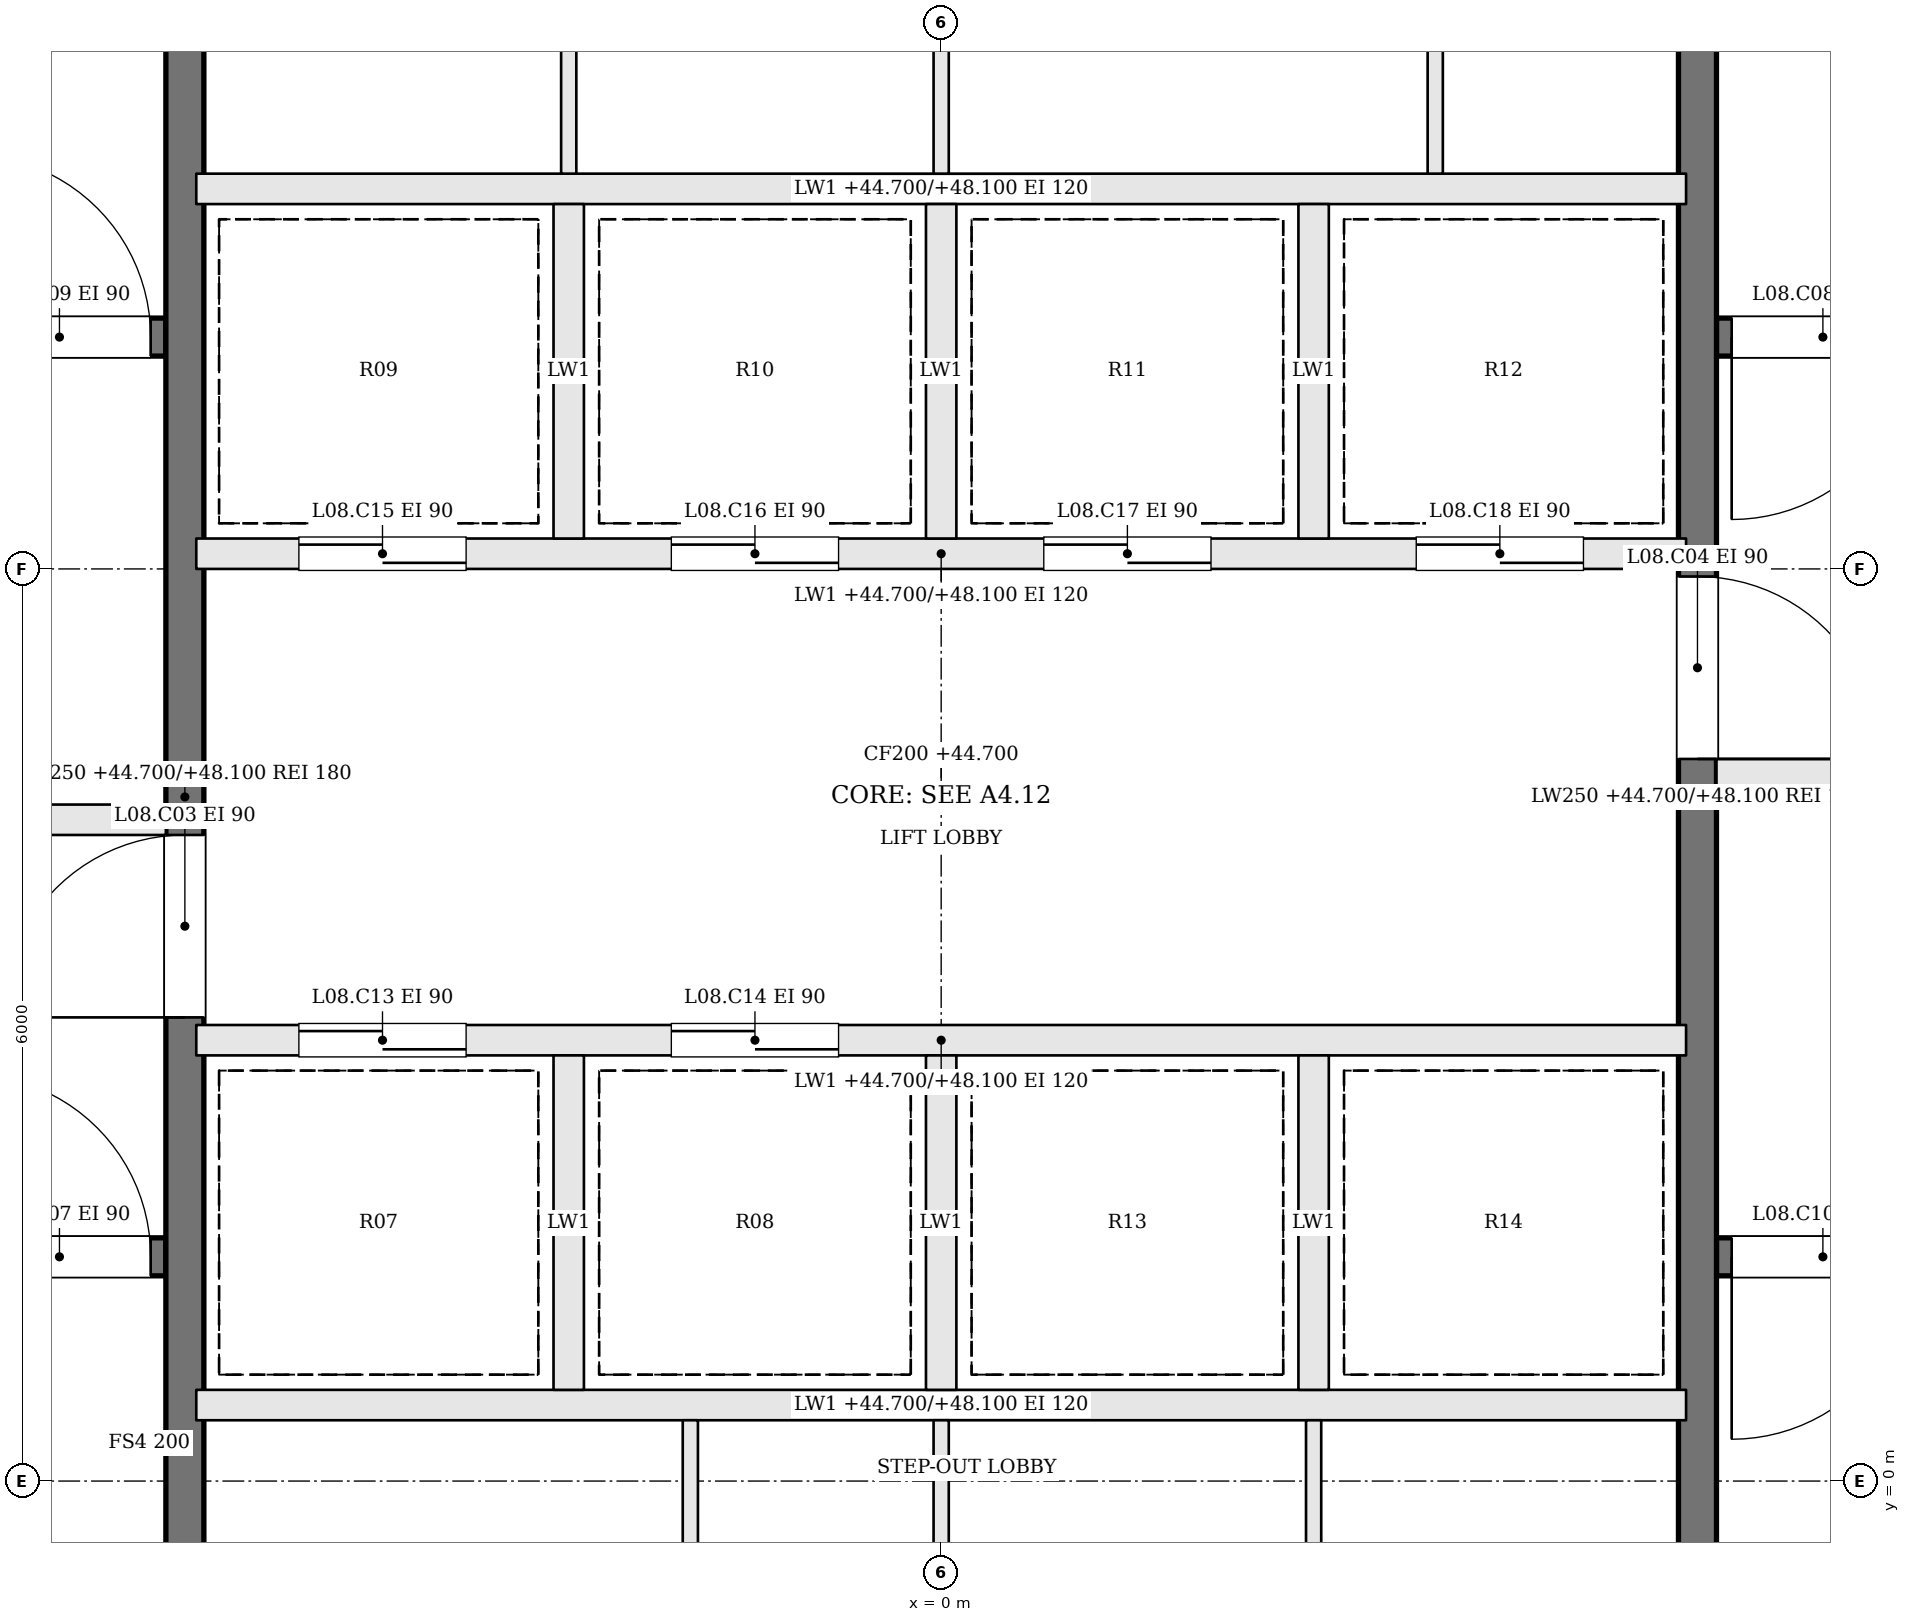
"""IFC4 building model, lengths in metres.
Left out: names, types, materials, properties, quantities, classifications, styles, units other than length and angle.
Written with IfcOpenShell. Run it as: python <this file> out.ifc"""

import sys

from ifc_helpers import new_model, si_unit, direction, frame, frame_2d, origin, place, context, subcontext, project, spatial, rectangle, extrude, element, fill, save


model = new_model("IFC4")
c1 = context("Model", 3, precision=1e-05, world=origin(), true_north=direction((0.0, 1.0)))
c2 = subcontext(c1, "Body", "Model", "MODEL_VIEW")
j1 = project(units=[si_unit("LENGTHUNIT", "METRE"), si_unit("PLANEANGLEUNIT", "RADIAN")], contexts=[c1])
p1 = place(None, origin())
s1 = spatial("IfcSite", under=j1, at=p1, CompositionType="ELEMENT")
p2 = place(p1, origin())
s2 = spatial("IfcBuilding", under=s1, at=p2, CompositionType="ELEMENT")
p3 = place(p2, frame((0.0, 0.0, 44.7)))
s3 = spatial("IfcBuildingStorey", under=s2, at=p3, CompositionType="ELEMENT", Elevation=44.7)
p4 = place(p3, frame((-11.6, 1.475, 0.0), z_axis=(0.0, 0.0, 1.0), x_axis=(1.0, 0.0, 0.0)))
e1 = element("IfcWall", 1, at=p4, inside=s3, PredefinedType="SOLIDWALL", context=c2, shape_type="SweptSolid", body=[
    extrude(rectangle(XDim=6.5, YDim=0.25, at=frame_2d((3.25, 0.0))), origin(), (0.0, 0.0, 1.0), 3.4),
])
p5 = place(p4, frame((5.2, 0.0, 0.0)))
e2 = element("IfcOpeningElement", 2, at=p5, cuts=e1, PredefinedType="OPENING", context=c2, shape_type="SweptSolid", body=[
    extrude(rectangle(XDim=1.2, YDim=2.1, at=frame_2d((0.6, 1.05))), frame((0.0, 0.135, 0.0), z_axis=(0.0, -1.0, 0.0), x_axis=(1.0, 0.0, 0.0)), (0.0, 0.0, 1.0), 0.27),
])
p6 = place(p3, frame((11.6, 7.525, 0.0), z_axis=(0.0, 0.0, 1.0), x_axis=(-1.0, 0.0, 0.0)))
e3 = element("IfcWall", 3, at=p6, inside=s3, PredefinedType="SOLIDWALL", context=c2, shape_type="SweptSolid", body=[
    extrude(rectangle(XDim=6.5, YDim=0.25, at=frame_2d((3.25, 0.0))), origin(), (0.0, 0.0, 1.0), 3.4),
])
p7 = place(p6, frame((5.2, 0.0, 0.0)))
e4 = element("IfcOpeningElement", 4, at=p7, cuts=e3, PredefinedType="OPENING", context=c2, shape_type="SweptSolid", body=[
    extrude(rectangle(XDim=1.2, YDim=2.1, at=frame_2d((0.6, 1.05))), frame((0.0, 0.135, 0.0), z_axis=(0.0, -1.0, 0.0), x_axis=(1.0, 0.0, 0.0)), (0.0, 0.0, 1.0), 0.27),
])
p8 = place(p3, frame((-11.6, 4.35, 0.0), z_axis=(0.0, 0.0, 1.0), x_axis=(1.0, 0.0, 0.0)))
e5 = element("IfcWall", 5, at=p8, inside=s3, PredefinedType="SOLIDWALL", context=c2, shape_type="SweptSolid", body=[
    extrude(rectangle(XDim=6.5, YDim=0.2, at=frame_2d((3.25, 0.0))), origin(), (0.0, 0.0, 1.0), 3.4),
])
p9 = place(p8, frame((3.8, 0.0, 0.0)))
e6 = element("IfcOpeningElement", 6, at=p9, cuts=e5, PredefinedType="OPENING", context=c2, shape_type="SweptSolid", body=[
    extrude(rectangle(XDim=1.2, YDim=2.1, at=frame_2d((0.6, 1.05))), frame((0.0, 0.11, 0.0), z_axis=(0.0, -1.0, 0.0), x_axis=(1.0, 0.0, 0.0)), (0.0, 0.0, 1.0), 0.22),
])
p10 = place(p8, frame((0.5, 0.0, 0.0)))
e7 = element("IfcOpeningElement", 7, at=p10, cuts=e5, PredefinedType="OPENING", context=c2, shape_type="SweptSolid", body=[
    extrude(rectangle(XDim=1.2, YDim=2.1, at=frame_2d((0.6, 1.05))), frame((0.0, 0.11, 0.0), z_axis=(0.0, -1.0, 0.0), x_axis=(1.0, 0.0, 0.0)), (0.0, 0.0, 1.0), 0.22),
])
p11 = place(p3, frame((11.6, 4.65, 0.0), z_axis=(0.0, 0.0, 1.0), x_axis=(-1.0, 0.0, 0.0)))
e8 = element("IfcWall", 8, at=p11, inside=s3, PredefinedType="SOLIDWALL", context=c2, shape_type="SweptSolid", body=[
    extrude(rectangle(XDim=6.5, YDim=0.2, at=frame_2d((3.25, 0.0))), origin(), (0.0, 0.0, 1.0), 3.4),
])
p12 = place(p11, frame((3.8, 0.0, 0.0)))
e9 = element("IfcOpeningElement", 9, at=p12, cuts=e8, PredefinedType="OPENING", context=c2, shape_type="SweptSolid", body=[
    extrude(rectangle(XDim=1.2, YDim=2.1, at=frame_2d((0.6, 1.05))), frame((0.0, 0.11, 0.0), z_axis=(0.0, -1.0, 0.0), x_axis=(1.0, 0.0, 0.0)), (0.0, 0.0, 1.0), 0.22),
])
p13 = place(p11, frame((0.5, 0.0, 0.0)))
e10 = element("IfcOpeningElement", 10, at=p13, cuts=e8, PredefinedType="OPENING", context=c2, shape_type="SweptSolid", body=[
    extrude(rectangle(XDim=1.2, YDim=2.1, at=frame_2d((0.6, 1.05))), frame((0.0, 0.11, 0.0), z_axis=(0.0, -1.0, 0.0), x_axis=(1.0, 0.0, 0.0)), (0.0, 0.0, 1.0), 0.22),
])
p14 = place(p3, frame((-11.6, 7.525, 0.0), z_axis=(0.0, 0.0, 1.0), x_axis=(1.0, 0.0, 0.0)))
e11 = element("IfcWall", 11, at=p14, inside=s3, PredefinedType="SOLIDWALL", context=c2, shape_type="SweptSolid", body=[
    extrude(rectangle(XDim=6.5, YDim=0.25, at=frame_2d((3.25, 0.0))), origin(), (0.0, 0.0, 1.0), 3.4),
])
p15 = place(p14, frame((5.2, 0.0, 0.0)))
e12 = element("IfcOpeningElement", 12, at=p15, cuts=e11, PredefinedType="OPENING", context=c2, shape_type="SweptSolid", body=[
    extrude(rectangle(XDim=1.2, YDim=2.1, at=frame_2d((0.6, 1.05))), frame((0.0, 0.135, 0.0), z_axis=(0.0, -1.0, 0.0), x_axis=(1.0, 0.0, 0.0)), (0.0, 0.0, 1.0), 0.27),
])
p16 = place(p3, frame((11.6, 1.475, 0.0), z_axis=(0.0, 0.0, 1.0), x_axis=(-1.0, 0.0, 0.0)))
e13 = element("IfcWall", 13, at=p16, inside=s3, PredefinedType="SOLIDWALL", context=c2, shape_type="SweptSolid", body=[
    extrude(rectangle(XDim=6.5, YDim=0.25, at=frame_2d((3.25, 0.0))), origin(), (0.0, 0.0, 1.0), 3.4),
])
p17 = place(p16, frame((5.2, 0.0, 0.0)))
e14 = element("IfcOpeningElement", 14, at=p17, cuts=e13, PredefinedType="OPENING", context=c2, shape_type="SweptSolid", body=[
    extrude(rectangle(XDim=1.2, YDim=2.1, at=frame_2d((0.6, 1.05))), frame((0.0, 0.135, 0.0), z_axis=(0.0, -1.0, 0.0), x_axis=(1.0, 0.0, 0.0)), (0.0, 0.0, 1.0), 0.27),
])
p18 = place(p3, frame((-4.975, -1.6, 0.0), z_axis=(0.0, 0.0, 1.0), x_axis=(0.0, 1.0, 0.0)))
e15 = element("IfcWall", 15, at=p18, inside=s3, PredefinedType="SOLIDWALL", context=c2, shape_type="SweptSolid", body=[
    extrude(rectangle(XDim=12.2, YDim=0.25, at=frame_2d((6.1, 0.0))), origin(), (0.0, 0.0, 1.0), 3.4),
])
p19 = place(p18, frame((4.65, 0.0, 0.0)))
e16 = element("IfcOpeningElement", 16, at=p19, cuts=e15, PredefinedType="OPENING", context=c2, shape_type="SweptSolid", body=[
    extrude(rectangle(XDim=1.2, YDim=2.1, at=frame_2d((0.6, 1.05))), frame((0.0, 0.135, 0.0), z_axis=(0.0, -1.0, 0.0), x_axis=(1.0, 0.0, 0.0)), (0.0, 0.0, 1.0), 0.27),
])
p20 = place(p3, frame((4.975, 10.6, 0.0), z_axis=(0.0, 0.0, 1.0), x_axis=(0.0, -1.0, 0.0)))
e17 = element("IfcWall", 17, at=p20, inside=s3, PredefinedType="SOLIDWALL", context=c2, shape_type="SweptSolid", body=[
    extrude(rectangle(XDim=12.2, YDim=0.25, at=frame_2d((6.1, 0.0))), origin(), (0.0, 0.0, 1.0), 3.4),
])
p21 = place(p20, frame((4.65, 0.0, 0.0)))
e18 = element("IfcOpeningElement", 18, at=p21, cuts=e17, PredefinedType="OPENING", context=c2, shape_type="SweptSolid", body=[
    extrude(rectangle(XDim=1.2, YDim=2.1, at=frame_2d((0.6, 1.05))), frame((0.0, 0.135, 0.0), z_axis=(0.0, -1.0, 0.0), x_axis=(1.0, 0.0, 0.0)), (0.0, 0.0, 1.0), 0.27),
])
p22 = place(p3, frame((-4.9, 0.5, 0.0), z_axis=(0.0, 0.0, 1.0), x_axis=(1.0, 0.0, 0.0)))
e19 = element("IfcWall", 19, at=p22, inside=s3, PredefinedType="SOLIDWALL", context=c2, shape_type="SweptSolid", body=[
    extrude(rectangle(XDim=9.8, YDim=0.2, at=frame_2d((4.9, 0.0))), origin(), (0.0, 0.0, 1.0), 3.4),
])
p23 = place(p3, frame((-4.9, 2.9, 0.0), z_axis=(0.0, 0.0, 1.0), x_axis=(1.0, 0.0, 0.0)))
e20 = element("IfcWall", 20, at=p23, inside=s3, PredefinedType="SOLIDWALL", context=c2, shape_type="SweptSolid", body=[
    extrude(rectangle(XDim=9.8, YDim=0.2, at=frame_2d((4.9, 0.0))), origin(), (0.0, 0.0, 1.0), 3.4),
])
p24 = place(p23, frame((0.675, 0.0, 0.0)))
e21 = element("IfcOpeningElement", 21, at=p24, cuts=e20, PredefinedType="OPENING", context=c2, shape_type="SweptSolid", body=[
    extrude(rectangle(XDim=1.1, YDim=2.1, at=frame_2d((0.55, 1.05))), frame((0.0, 0.11, 0.0), z_axis=(0.0, -1.0, 0.0), x_axis=(1.0, 0.0, 0.0)), (0.0, 0.0, 1.0), 0.22),
])
p25 = place(p23, frame((3.125, 0.0, 0.0)))
e22 = element("IfcOpeningElement", 22, at=p25, cuts=e20, PredefinedType="OPENING", context=c2, shape_type="SweptSolid", body=[
    extrude(rectangle(XDim=1.1, YDim=2.1, at=frame_2d((0.55, 1.05))), frame((0.0, 0.11, 0.0), z_axis=(0.0, -1.0, 0.0), x_axis=(1.0, 0.0, 0.0)), (0.0, 0.0, 1.0), 0.22),
])
p26 = place(p3, frame((-4.9, 6.1, 0.0), z_axis=(0.0, 0.0, 1.0), x_axis=(1.0, 0.0, 0.0)))
e23 = element("IfcWall", 23, at=p26, inside=s3, PredefinedType="SOLIDWALL", context=c2, shape_type="SweptSolid", body=[
    extrude(rectangle(XDim=9.8, YDim=0.2, at=frame_2d((4.9, 0.0))), origin(), (0.0, 0.0, 1.0), 3.4),
])
p27 = place(p26, frame((0.675, 0.0, 0.0)))
e24 = element("IfcOpeningElement", 24, at=p27, cuts=e23, PredefinedType="OPENING", context=c2, shape_type="SweptSolid", body=[
    extrude(rectangle(XDim=1.1, YDim=2.1, at=frame_2d((0.55, 1.05))), frame((0.0, 0.11, 0.0), z_axis=(0.0, -1.0, 0.0), x_axis=(1.0, 0.0, 0.0)), (0.0, 0.0, 1.0), 0.22),
])
p28 = place(p26, frame((3.125, 0.0, 0.0)))
e25 = element("IfcOpeningElement", 25, at=p28, cuts=e23, PredefinedType="OPENING", context=c2, shape_type="SweptSolid", body=[
    extrude(rectangle(XDim=1.1, YDim=2.1, at=frame_2d((0.55, 1.05))), frame((0.0, 0.11, 0.0), z_axis=(0.0, -1.0, 0.0), x_axis=(1.0, 0.0, 0.0)), (0.0, 0.0, 1.0), 0.22),
])
p29 = place(p26, frame((5.575, 0.0, 0.0)))
e26 = element("IfcOpeningElement", 26, at=p29, cuts=e23, PredefinedType="OPENING", context=c2, shape_type="SweptSolid", body=[
    extrude(rectangle(XDim=1.1, YDim=2.1, at=frame_2d((0.55, 1.05))), frame((0.0, 0.11, 0.0), z_axis=(0.0, -1.0, 0.0), x_axis=(1.0, 0.0, 0.0)), (0.0, 0.0, 1.0), 0.22),
])
p30 = place(p26, frame((8.025, 0.0, 0.0)))
e27 = element("IfcOpeningElement", 27, at=p30, cuts=e23, PredefinedType="OPENING", context=c2, shape_type="SweptSolid", body=[
    extrude(rectangle(XDim=1.1, YDim=2.1, at=frame_2d((0.55, 1.05))), frame((0.0, 0.11, 0.0), z_axis=(0.0, -1.0, 0.0), x_axis=(1.0, 0.0, 0.0)), (0.0, 0.0, 1.0), 0.22),
])
p31 = place(p3, frame((-4.9, 8.5, 0.0), z_axis=(0.0, 0.0, 1.0), x_axis=(1.0, 0.0, 0.0)))
e28 = element("IfcWall", 28, at=p31, inside=s3, PredefinedType="SOLIDWALL", context=c2, shape_type="SweptSolid", body=[
    extrude(rectangle(XDim=9.8, YDim=0.2, at=frame_2d((4.9, 0.0))), origin(), (0.0, 0.0, 1.0), 3.4),
])
for number, where, z_axis, x_axis in (
    (29, (-2.45, 0.6, 0.0), (0.0, 0.0, 1.0), (0.0, 1.0, 0.0)),
    (30, (0.0, 0.6, 0.0), (0.0, 0.0, 1.0), (0.0, 1.0, 0.0)),
    (31, (2.45, 0.6, 0.0), (0.0, 0.0, 1.0), (0.0, 1.0, 0.0)),
    (32, (-2.45, 6.2, 0.0), (0.0, 0.0, 1.0), (0.0, 1.0, 0.0)),
    (33, (0.0, 6.2, 0.0), (0.0, 0.0, 1.0), (0.0, 1.0, 0.0)),
    (34, (2.45, 6.2, 0.0), (0.0, 0.0, 1.0), (0.0, 1.0, 0.0)),
):
    element("IfcWall", number, at=place(p3, frame(where, z_axis=z_axis, x_axis=x_axis)), inside=s3, PredefinedType="SOLIDWALL", context=c2, shape_type="SweptSolid", body=[
        extrude(rectangle(XDim=2.2, YDim=0.2, at=frame_2d((1.1, 0.0))), origin(), (0.0, 0.0, 1.0), 3.4),
    ])
for number, where, z_axis, x_axis in (
    (35, (-1.65, -1.6, 0.0), (0.0, 0.0, 1.0), (0.0, 1.0, 0.0)),
    (36, (0.0, -1.6, 0.0), (0.0, 0.0, 1.0), (0.0, 1.0, 0.0)),
    (37, (2.45, -1.6, 0.0), (0.0, 0.0, 1.0), (0.0, 1.0, 0.0)),
    (38, (-2.45, 8.6, 0.0), (0.0, 0.0, 1.0), (0.0, 1.0, 0.0)),
    (39, (0.0, 8.6, 0.0), (0.0, 0.0, 1.0), (0.0, 1.0, 0.0)),
    (40, (3.25, 8.6, 0.0), (0.0, 0.0, 1.0), (0.0, 1.0, 0.0)),
):
    element("IfcWall", number, at=place(p3, frame(where, z_axis=z_axis, x_axis=x_axis)), inside=s3, PredefinedType="PARTITIONING", context=c2, shape_type="SweptSolid", body=[
        extrude(rectangle(XDim=2.0, YDim=0.1, at=frame_2d((1.0, 0.0))), origin(), (0.0, 0.0, 1.0), 3.4),
    ])
p32 = place(p19, origin())
e41 = element("IfcDoor", 41, at=p32, inside=s3, OperationType="SINGLE_SWING_LEFT", PredefinedType="DOOR", context=c2, shape_type="SweptSolid", body=[
    extrude(rectangle(XDim=1.2, YDim=2.1, at=frame_2d((0.6, 1.05))), frame((0.0, 0.025, 0.0), z_axis=(0.0, -1.0, 0.0), x_axis=(1.0, 0.0, 0.0)), (0.0, 0.0, 1.0), 0.05),
])
fill(e16, e41)
p33 = place(p21, origin())
e42 = element("IfcDoor", 42, at=p33, inside=s3, OperationType="SINGLE_SWING_RIGHT", PredefinedType="DOOR", context=c2, shape_type="SweptSolid", body=[
    extrude(rectangle(XDim=1.2, YDim=2.1, at=frame_2d((0.6, 1.05))), frame((0.0, 0.025, 0.0), z_axis=(0.0, -1.0, 0.0), x_axis=(1.0, 0.0, 0.0)), (0.0, 0.0, 1.0), 0.05),
])
fill(e18, e42)
p34 = place(p5, origin())
e43 = element("IfcDoor", 43, at=p34, inside=s3, OperationType="SINGLE_SWING_LEFT", PredefinedType="DOOR", context=c2, shape_type="SweptSolid", body=[
    extrude(rectangle(XDim=1.2, YDim=2.1, at=frame_2d((0.6, 1.05))), frame((0.0, 0.025, 0.0), z_axis=(0.0, -1.0, 0.0), x_axis=(1.0, 0.0, 0.0)), (0.0, 0.0, 1.0), 0.05),
])
fill(e2, e43)
p35 = place(p7, origin())
e44 = element("IfcDoor", 44, at=p35, inside=s3, OperationType="SINGLE_SWING_RIGHT", PredefinedType="DOOR", context=c2, shape_type="SweptSolid", body=[
    extrude(rectangle(XDim=1.2, YDim=2.1, at=frame_2d((0.6, 1.05))), frame((0.0, 0.025, 0.0), z_axis=(0.0, -1.0, 0.0), x_axis=(1.0, 0.0, 0.0)), (0.0, 0.0, 1.0), 0.05),
])
fill(e4, e44)
p36 = place(p15, origin())
e45 = element("IfcDoor", 45, at=p36, inside=s3, OperationType="SINGLE_SWING_LEFT", PredefinedType="DOOR", context=c2, shape_type="SweptSolid", body=[
    extrude(rectangle(XDim=1.2, YDim=2.1, at=frame_2d((0.6, 1.05))), frame((0.0, 0.025, 0.0), z_axis=(0.0, -1.0, 0.0), x_axis=(1.0, 0.0, 0.0)), (0.0, 0.0, 1.0), 0.05),
])
fill(e12, e45)
p37 = place(p17, origin())
e46 = element("IfcDoor", 46, at=p37, inside=s3, OperationType="SINGLE_SWING_RIGHT", PredefinedType="DOOR", context=c2, shape_type="SweptSolid", body=[
    extrude(rectangle(XDim=1.2, YDim=2.1, at=frame_2d((0.6, 1.05))), frame((0.0, 0.025, 0.0), z_axis=(0.0, -1.0, 0.0), x_axis=(1.0, 0.0, 0.0)), (0.0, 0.0, 1.0), 0.05),
])
fill(e14, e46)
p38 = place(p24, origin())
e47 = element("IfcDoor", 47, at=p38, inside=s3, OperationType="SLIDING_TO_RIGHT", PredefinedType="DOOR", context=c2, shape_type="SweptSolid", body=[
    extrude(rectangle(XDim=1.1, YDim=2.1, at=frame_2d((0.55, 1.05))), frame((0.0, 0.025, 0.0), z_axis=(0.0, -1.0, 0.0), x_axis=(1.0, 0.0, 0.0)), (0.0, 0.0, 1.0), 0.05),
])
fill(e21, e47)
p39 = place(p25, origin())
e48 = element("IfcDoor", 48, at=p39, inside=s3, OperationType="SLIDING_TO_LEFT", PredefinedType="DOOR", context=c2, shape_type="SweptSolid", body=[
    extrude(rectangle(XDim=1.1, YDim=2.1, at=frame_2d((0.55, 1.05))), frame((0.0, 0.025, 0.0), z_axis=(0.0, -1.0, 0.0), x_axis=(1.0, 0.0, 0.0)), (0.0, 0.0, 1.0), 0.05),
])
fill(e22, e48)
p40 = place(p27, origin())
e49 = element("IfcDoor", 49, at=p40, inside=s3, OperationType="SLIDING_TO_RIGHT", PredefinedType="DOOR", context=c2, shape_type="SweptSolid", body=[
    extrude(rectangle(XDim=1.1, YDim=2.1, at=frame_2d((0.55, 1.05))), frame((0.0, 0.025, 0.0), z_axis=(0.0, -1.0, 0.0), x_axis=(1.0, 0.0, 0.0)), (0.0, 0.0, 1.0), 0.05),
])
fill(e24, e49)
p41 = place(p28, origin())
e50 = element("IfcDoor", 50, at=p41, inside=s3, OperationType="SLIDING_TO_LEFT", PredefinedType="DOOR", context=c2, shape_type="SweptSolid", body=[
    extrude(rectangle(XDim=1.1, YDim=2.1, at=frame_2d((0.55, 1.05))), frame((0.0, 0.025, 0.0), z_axis=(0.0, -1.0, 0.0), x_axis=(1.0, 0.0, 0.0)), (0.0, 0.0, 1.0), 0.05),
])
fill(e25, e50)
p42 = place(p29, origin())
e51 = element("IfcDoor", 51, at=p42, inside=s3, OperationType="SLIDING_TO_RIGHT", PredefinedType="DOOR", context=c2, shape_type="SweptSolid", body=[
    extrude(rectangle(XDim=1.1, YDim=2.1, at=frame_2d((0.55, 1.05))), frame((0.0, 0.025, 0.0), z_axis=(0.0, -1.0, 0.0), x_axis=(1.0, 0.0, 0.0)), (0.0, 0.0, 1.0), 0.05),
])
fill(e26, e51)
p43 = place(p30, origin())
e52 = element("IfcDoor", 52, at=p43, inside=s3, OperationType="SLIDING_TO_LEFT", PredefinedType="DOOR", context=c2, shape_type="SweptSolid", body=[
    extrude(rectangle(XDim=1.1, YDim=2.1, at=frame_2d((0.55, 1.05))), frame((0.0, 0.025, 0.0), z_axis=(0.0, -1.0, 0.0), x_axis=(1.0, 0.0, 0.0)), (0.0, 0.0, 1.0), 0.05),
])
fill(e27, e52)
save(model, sys.argv[1])
